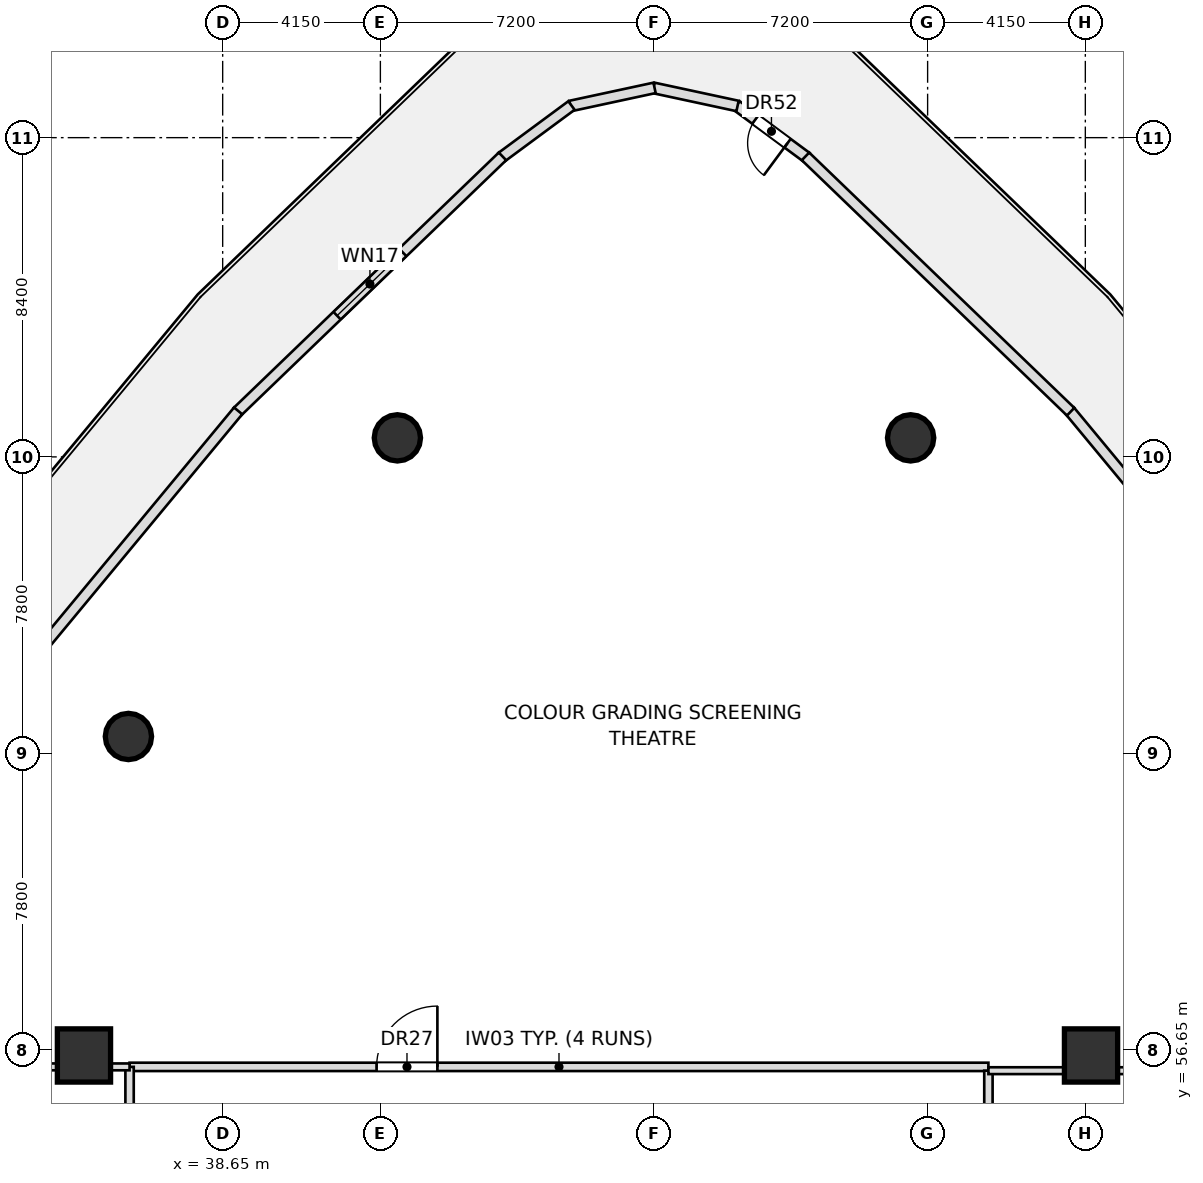
"""IFC4 building model, lengths in metres.
Left out: names, types, materials, properties, quantities, classifications, styles, units other than length and angle.
Written with IfcOpenShell. Run it as: python <this file> out.ifc"""

import sys

from ifc_helpers import new_model, si_unit, direction, frame, frame_2d, origin, origin_2d, place, context, subcontext, project, spatial, rectangle, hollow_circle, extrude, element, fill, save


model = new_model("IFC4")
c1 = context("Model", 3, precision=1e-05, world=origin(), true_north=direction((0.0, 1.0)))
c2 = subcontext(c1, "Body", "Model", "MODEL_VIEW")
j1 = project(units=[si_unit("LENGTHUNIT", "METRE"), si_unit("PLANEANGLEUNIT", "RADIAN")], contexts=[c1])
p1 = place(None, origin())
s1 = spatial("IfcSite", under=j1, at=p1, CompositionType="ELEMENT")
p2 = place(p1, origin())
s2 = spatial("IfcBuilding", under=s1, at=p2, CompositionType="ELEMENT")
p3 = place(p2, frame((0.0, 0.0, 16.8)))
s3 = spatial("IfcBuildingStorey", under=s2, at=p3, CompositionType="ELEMENT", Elevation=16.8)
for number, where, z_axis, x_axis in (
    (1, (61.5, 56.5, 0.0), (0.0, 0.0, 1.0), (1.0, 0.0, 0.0)),
    (2, (35.0, 56.5, 0.0), (0.0, 0.0, 1.0), (1.0, 0.0, 0.0)),
):
    element("IfcColumn", number, at=place(p3, frame(where, z_axis=z_axis, x_axis=x_axis)), inside=s3, PredefinedType="COLUMN", context=c2, shape_type="SweptSolid", body=[
        extrude(rectangle(XDim=1.4, YDim=1.4, at=origin_2d()), origin(), (0.0, 0.0, 1.0), 4.95),
    ])
for number, where, z_axis, x_axis in (
    (3, (43.247, 72.751, 0.0), (0.0, 0.0, 1.0), (1.0, 0.0, 0.0)),
    (4, (36.17, 64.893, 0.0), (0.0, 0.0, 1.0), (1.0, 0.0, 0.0)),
    (5, (56.753, 72.751, 0.0), (0.0, 0.0, 1.0), (1.0, 0.0, 0.0)),
):
    element("IfcColumn", number, at=place(p3, frame(where, z_axis=z_axis, x_axis=x_axis)), inside=s3, PredefinedType="COLUMN", context=c2, shape_type="SweptSolid", body=[
        extrude(hollow_circle(Radius=0.61, WallThickness=0.05, at=origin_2d()), origin(), (0.0, 0.0, 1.0), 4.95),
    ])
p4 = place(p3, frame((36.2, 56.2, 0.0), z_axis=(0.0, 0.0, 1.0), x_axis=(1.0, 0.0, 0.0)))
e6 = element("IfcWall", 6, at=p4, inside=s3, PredefinedType="PARTITIONING", context=c2, shape_type="SweptSolid", body=[
    extrude(rectangle(XDim=22.6, YDim=0.22, at=frame_2d((11.3, 0.0))), origin(), (0.0, 0.0, 1.0), 4.95),
])
p5 = place(p4, frame((6.5, 0.0, 0.0)))
e7 = element("IfcOpeningElement", 7, at=p5, cuts=e6, PredefinedType="OPENING", context=c2, shape_type="SweptSolid", body=[
    extrude(rectangle(XDim=1.6, YDim=2.3, at=frame_2d((0.8, 1.15))), frame((0.0, 0.12, 0.0), z_axis=(0.0, -1.0, 0.0), x_axis=(1.0, 0.0, 0.0)), (0.0, 0.0, 1.0), 0.24),
])
p6 = place(p3, frame((36.2, 38.1, 0.0), z_axis=(0.0, 0.0, 1.0), x_axis=(0.0, 1.0, 0.0)))
e8 = element("IfcWall", 8, at=p6, inside=s3, PredefinedType="PARTITIONING", context=c2, shape_type="SweptSolid", body=[
    extrude(rectangle(XDim=18.1, YDim=0.22, at=frame_2d((9.05, 0.0))), origin(), (0.0, 0.0, 1.0), 4.025),
])
p7 = place(p6, frame((5.5, 0.0, 0.0)))
e9 = element("IfcOpeningElement", 9, at=p7, cuts=e8, PredefinedType="OPENING", context=c2, shape_type="SweptSolid", body=[
    extrude(rectangle(XDim=1.6, YDim=2.3, at=frame_2d((0.8, 1.15))), frame((0.0, 0.12, 0.0), z_axis=(0.0, -1.0, 0.0), x_axis=(1.0, 0.0, 0.0)), (0.0, 0.0, 1.0), 0.24),
])
p8 = place(p3, frame((26.765, 56.2, 0.0), z_axis=(0.0, 0.0, 1.0), x_axis=(1.0, 0.0, 0.0)))
e10 = element("IfcWall", 10, at=p8, inside=s3, PredefinedType="PARTITIONING", context=c2, shape_type="SweptSolid", body=[
    extrude(rectangle(XDim=9.435, YDim=0.18, at=frame_2d((4.718, 0.0))), origin(), (0.0, 0.0, 1.0), 4.125),
])
p9 = place(p3, frame((58.8, 44.55, 0.0), z_axis=(0.0, 0.0, 1.0), x_axis=(0.0, 1.0, 0.0)))
e11 = element("IfcWall", 11, at=p9, inside=s3, PredefinedType="PARTITIONING", context=c2, shape_type="SweptSolid", body=[
    extrude(rectangle(XDim=11.55, YDim=0.22, at=frame_2d((5.775, 0.0))), origin(), (0.0, 0.0, 1.0), 4.025),
])
p10 = place(p9, frame((5.2, 0.0, 0.0)))
e12 = element("IfcOpeningElement", 12, at=p10, cuts=e11, PredefinedType="OPENING", context=c2, shape_type="SweptSolid", body=[
    extrude(rectangle(XDim=1.6, YDim=2.3, at=frame_2d((0.8, 1.15))), frame((0.0, 0.12, 0.0), z_axis=(0.0, -1.0, 0.0), x_axis=(1.0, 0.0, 0.0)), (0.0, 0.0, 1.0), 0.24),
])
p11 = place(p3, frame((58.8, 56.1, 0.0), z_axis=(0.0, 0.0, 1.0), x_axis=(1.0, 0.0, 0.0)))
e13 = element("IfcWall", 13, at=p11, inside=s3, PredefinedType="PARTITIONING", context=c2, shape_type="SweptSolid", body=[
    extrude(rectangle(XDim=14.485, YDim=0.18, at=frame_2d((7.243, 0.0))), origin(), (0.0, 0.0, 1.0), 4.125),
])
p12 = place(p3, frame((54.01, 80.138, 0.0), z_axis=(0.0, 0.0, 1.0), x_axis=(-0.804300483678, 0.594222796563, 0.0)))
e14 = element("IfcWall", 14, at=p12, inside=s3, PredefinedType="STANDARD", context=c2, shape_type="SweptSolid", body=[
    extrude(rectangle(XDim=2.285, YDim=0.28, at=frame_2d((1.142, 0.0))), origin(), (0.0, 0.0, 1.0), 4.95),
])
p13 = place(p12, frame((0.617, 0.0, 0.0)))
e15 = element("IfcOpeningElement", 15, at=p13, cuts=e14, PredefinedType="OPENING", context=c2, shape_type="SweptSolid", body=[
    extrude(rectangle(XDim=1.05, YDim=2.2, at=frame_2d((0.525, 1.1))), frame((0.0, 0.15, 0.0), z_axis=(0.0, -1.0, 0.0), x_axis=(1.0, 0.0, 0.0)), (0.0, 0.0, 1.0), 0.3),
])
for number, where, z_axis, x_axis in (
    (16, (52.198, 81.483, 0.0), (0.0, 0.0, 1.0), (-0.978, 0.211, 0.0)),
    (17, (50.015, 81.96, 0.0), (0.0, 0.0, 1.0), (-0.978, -0.211, 0.0)),
):
    element("IfcWall", number, at=place(p3, frame(where, z_axis=z_axis, x_axis=x_axis)), inside=s3, PredefinedType="STANDARD", context=c2, shape_type="SweptSolid", body=[
        extrude(rectangle(XDim=2.264, YDim=0.28, at=frame_2d((1.132, 0.0))), origin(), (0.0, 0.0, 1.0), 4.95),
    ])
p14 = place(p3, frame((47.828, 81.496, 0.0), z_axis=(0.0, 0.0, 1.0), x_axis=(-0.804300483678, -0.594222796563, 0.0)))
e18 = element("IfcWall", 18, at=p14, inside=s3, PredefinedType="STANDARD", context=c2, shape_type="SweptSolid", body=[
    extrude(rectangle(XDim=2.285, YDim=0.28, at=frame_2d((1.142, 0.0))), origin(), (0.0, 0.0, 1.0), 4.95),
])
p15 = place(p3, frame((46.013, 80.157, 0.0), z_axis=(0.0, 0.0, 1.0), x_axis=(-0.720315548833, -0.693646531102, 0.0)))
e19 = element("IfcWall", 19, at=p15, inside=s3, PredefinedType="STANDARD", context=c2, shape_type="SweptSolid", body=[
    extrude(rectangle(XDim=9.686, YDim=0.28, at=frame_2d((4.843, 0.0))), origin(), (0.0, 0.0, 1.0), 4.95),
])
p16 = place(p15, frame((3.643, 0.0, 1.0)))
e20 = element("IfcOpeningElement", 20, at=p16, cuts=e19, PredefinedType="OPENING", context=c2, shape_type="SweptSolid", body=[
    extrude(rectangle(XDim=2.4, YDim=1.5, at=frame_2d((1.2, 0.75))), frame((0.0, 0.15, 0.0), z_axis=(0.0, -1.0, 0.0), x_axis=(1.0, 0.0, 0.0)), (0.0, 0.0, 1.0), 0.3),
])
p17 = place(p3, frame((39.057, 73.461, 0.0), z_axis=(0.0, 0.0, 1.0), x_axis=(-0.638064831354, -0.769982643304, 0.0)))
e21 = element("IfcWall", 21, at=p17, inside=s3, PredefinedType="STANDARD", context=c2, shape_type="SweptSolid", body=[
    extrude(rectangle(XDim=9.687, YDim=0.28, at=frame_2d((4.843, 0.0))), origin(), (0.0, 0.0, 1.0), 4.95),
])
p18 = place(p3, frame((67.124, 66.002, 0.0), z_axis=(0.0, 0.0, 1.0), x_axis=(-0.638064831354, 0.769982643304, 0.0)))
e22 = element("IfcWall", 22, at=p18, inside=s3, PredefinedType="STANDARD", context=c2, shape_type="SweptSolid", body=[
    extrude(rectangle(XDim=9.687, YDim=0.28, at=frame_2d((4.843, 0.0))), origin(), (0.0, 0.0, 1.0), 4.95),
])
p19 = place(p18, frame((3.643, 0.0, 1.0)))
e23 = element("IfcOpeningElement", 23, at=p19, cuts=e22, PredefinedType="OPENING", context=c2, shape_type="SweptSolid", body=[
    extrude(rectangle(XDim=2.4, YDim=1.5, at=frame_2d((1.2, 0.75))), frame((0.0, 0.15, 0.0), z_axis=(0.0, -1.0, 0.0), x_axis=(1.0, 0.0, 0.0)), (0.0, 0.0, 1.0), 0.3),
])
p20 = place(p3, frame((60.963, 73.439, 0.0), z_axis=(0.0, 0.0, 1.0), x_axis=(-0.720315548833, 0.693646531102, 0.0)))
e24 = element("IfcWall", 24, at=p20, inside=s3, PredefinedType="STANDARD", context=c2, shape_type="SweptSolid", body=[
    extrude(rectangle(XDim=9.686, YDim=0.28, at=frame_2d((4.843, 0.0))), origin(), (0.0, 0.0, 1.0), 4.95),
])
p21 = place(p5, origin())
e25 = element("IfcDoor", 25, at=p21, inside=s3, OperationType="SINGLE_SWING_RIGHT", PredefinedType="DOOR", context=c2, shape_type="SweptSolid", body=[
    extrude(rectangle(XDim=1.6, YDim=2.3, at=frame_2d((0.8, 1.15))), frame((0.0, 0.025, 0.0), z_axis=(0.0, -1.0, 0.0), x_axis=(1.0, 0.0, 0.0)), (0.0, 0.0, 1.0), 0.05),
])
fill(e7, e25)
p22 = place(p13, origin())
e26 = element("IfcDoor", 26, at=p22, inside=s3, OperationType="SINGLE_SWING_LEFT", PredefinedType="DOOR", context=c2, shape_type="SweptSolid", body=[
    extrude(rectangle(XDim=1.05, YDim=2.2, at=frame_2d((0.525, 1.1))), frame((0.0, 0.025, 0.0), z_axis=(0.0, -1.0, 0.0), x_axis=(1.0, 0.0, 0.0)), (0.0, 0.0, 1.0), 0.05),
])
fill(e15, e26)
p23 = place(p16, origin())
e27 = element("IfcWindow", 27, at=p23, inside=s3, PartitioningType="SINGLE_PANEL", PredefinedType="WINDOW", context=c2, shape_type="SweptSolid", body=[
    extrude(rectangle(XDim=2.4, YDim=1.5, at=frame_2d((1.2, 0.75))), frame((0.0, 0.03, 0.0), z_axis=(0.0, -1.0, 0.0), x_axis=(1.0, 0.0, 0.0)), (0.0, 0.0, 1.0), 0.06),
])
fill(e20, e27)
save(model, sys.argv[1])
